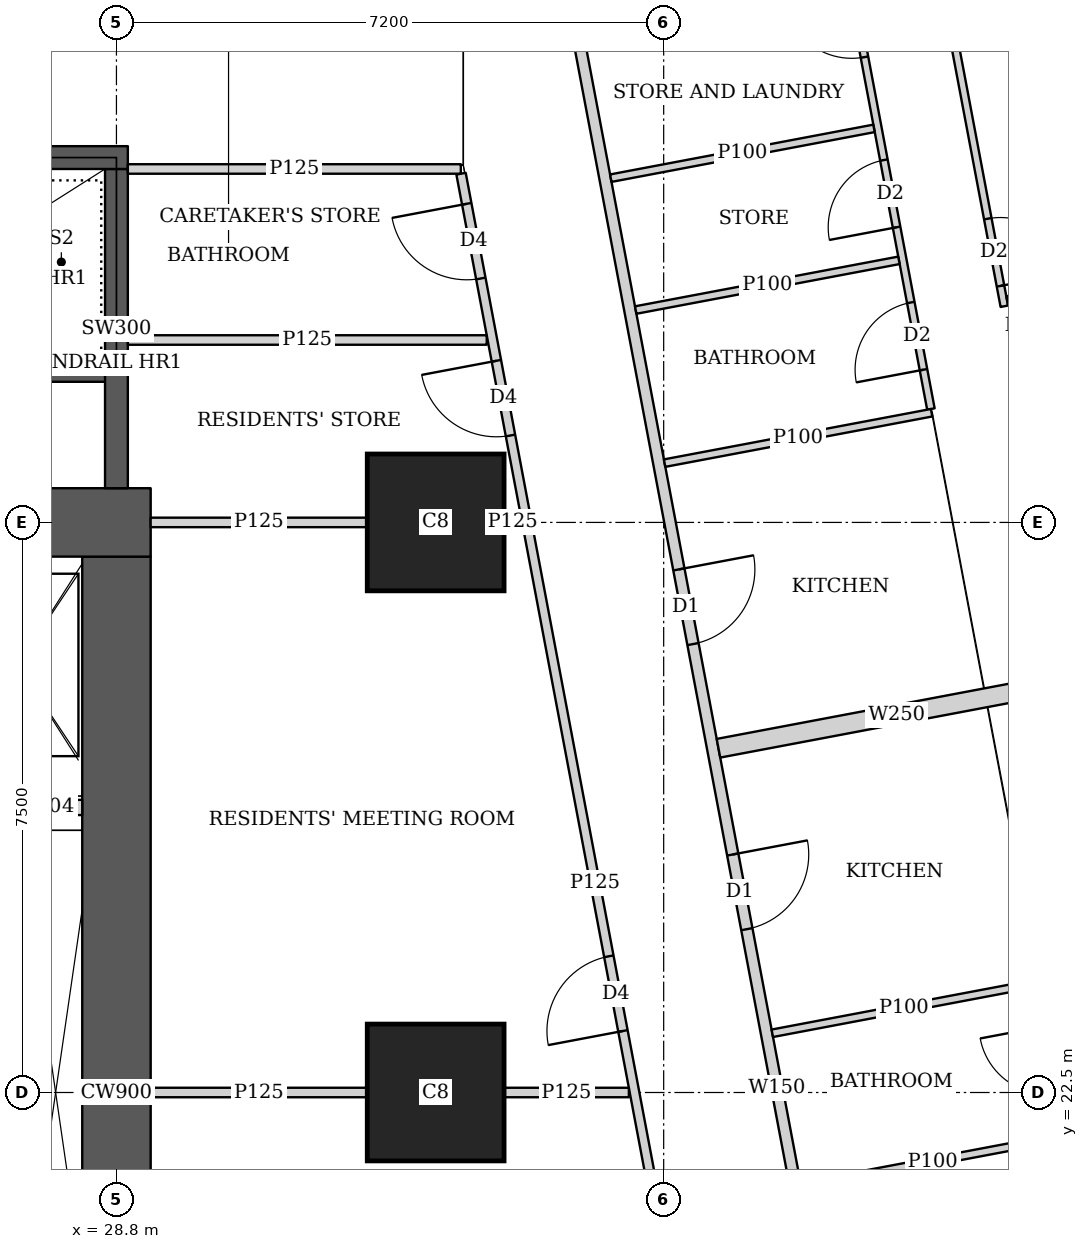
"""IFC4 building model, lengths in metres.
Left out: names, types, materials, properties, quantities, classifications, styles, units other than length and angle.
Written with IfcOpenShell. Run it as: python <this file> out.ifc"""

import sys

from ifc_helpers import new_model, si_unit, direction, frame, frame_2d, origin, origin_2d, place, context, subcontext, project, spatial, rectangle, extrude, element, fill, save


model = new_model("IFC4")
c1 = context("Model", 3, precision=1e-05, world=origin(), true_north=direction((0.0, 1.0)))
c2 = subcontext(c1, "Body", "Model", "MODEL_VIEW")
j1 = project(units=[si_unit("LENGTHUNIT", "METRE"), si_unit("PLANEANGLEUNIT", "RADIAN")], contexts=[c1])
p1 = place(None, origin())
s1 = spatial("IfcSite", under=j1, at=p1, CompositionType="ELEMENT")
p2 = place(p1, origin())
s2 = spatial("IfcBuilding", under=s1, at=p2, CompositionType="ELEMENT")
p3 = place(p2, frame((0.0, 0.0, 68.75)))
s3 = spatial("IfcBuildingStorey", under=s2, at=p3, CompositionType="ELEMENT", Elevation=68.75)
for number, where, z_axis, x_axis in (
    (1, (33.0, 22.5, 0.0), (0.0, 0.0, 1.0), (1.0, 0.0, 0.0)),
    (2, (33.0, 30.0, 0.0), (0.0, 0.0, 1.0), (1.0, 0.0, 0.0)),
):
    element("IfcColumn", number, at=place(p3, frame(where, z_axis=z_axis, x_axis=x_axis)), inside=s3, PredefinedType="COLUMN", context=c2, shape_type="SweptSolid", body=[
        extrude(rectangle(XDim=1.8, YDim=1.8, at=origin_2d()), origin(), (0.0, 0.0, 1.0), 3.75),
    ])
p4 = place(p3, frame((13.95, 30.0, 0.0), z_axis=(0.0, 0.0, 1.0), x_axis=(1.0, 0.0, 0.0)))
e3 = element("IfcWall", 3, at=p4, inside=s3, PredefinedType="SHEAR", context=c2, shape_type="SweptSolid", body=[
    extrude(rectangle(XDim=15.3, YDim=0.9, at=frame_2d((7.65, 0.0))), origin(), (0.0, 0.0, 1.0), 3.75),
])
p5 = place(p4, frame((4.45, 0.0, 0.0)))
e4 = element("IfcOpeningElement", 4, at=p5, cuts=e3, PredefinedType="OPENING", context=c2, shape_type="SweptSolid", body=[
    extrude(rectangle(XDim=1.8, YDim=2.1, at=frame_2d((0.9, 1.05))), frame((0.0, 0.46, 0.0), z_axis=(0.0, -1.0, 0.0), x_axis=(1.0, 0.0, 0.0)), (0.0, 0.0, 1.0), 0.92),
])
p6 = place(p4, frame((10.7, 0.0, 0.0)))
e5 = element("IfcOpeningElement", 5, at=p6, cuts=e3, PredefinedType="OPENING", context=c2, shape_type="SweptSolid", body=[
    extrude(rectangle(XDim=1.1, YDim=2.1, at=frame_2d((0.55, 1.05))), frame((0.0, 0.46, 0.0), z_axis=(0.0, -1.0, 0.0), x_axis=(1.0, 0.0, 0.0)), (0.0, 0.0, 1.0), 0.92),
])
p7 = place(p3, frame((28.8, 15.45, 0.0), z_axis=(0.0, 0.0, 1.0), x_axis=(0.0, 1.0, 0.0)))
e6 = element("IfcWall", 6, at=p7, inside=s3, PredefinedType="SHEAR", context=c2, shape_type="SweptSolid", body=[
    extrude(rectangle(XDim=14.1, YDim=0.9, at=frame_2d((7.05, 0.0))), origin(), (0.0, 0.0, 1.0), 3.75),
])
p8 = place(p3, frame((21.45, 34.8, 0.0), z_axis=(0.0, 0.0, 1.0), x_axis=(1.0, 0.0, 0.0)))
e7 = element("IfcWall", 7, at=p8, inside=s3, PredefinedType="SHEAR", context=c2, shape_type="SweptSolid", body=[
    extrude(rectangle(XDim=7.5, YDim=0.3, at=frame_2d((3.75, 0.0))), origin(), (0.0, 0.0, 1.0), 3.75),
])
p9 = place(p8, frame((0.5, 0.0, 0.0)))
e8 = element("IfcOpeningElement", 8, at=p9, cuts=e7, PredefinedType="OPENING", context=c2, shape_type="SweptSolid", body=[
    extrude(rectangle(XDim=1.1, YDim=2.1, at=frame_2d((0.55, 1.05))), frame((0.0, 0.16, 0.0), z_axis=(0.0, -1.0, 0.0), x_axis=(1.0, 0.0, 0.0)), (0.0, 0.0, 1.0), 0.32),
])
p10 = place(p3, frame((28.8, 30.45, 0.0), z_axis=(0.0, 0.0, 1.0), x_axis=(0.0, 1.0, 0.0)))
e9 = element("IfcWall", 9, at=p10, inside=s3, PredefinedType="SHEAR", context=c2, shape_type="SweptSolid", body=[
    extrude(rectangle(XDim=4.2, YDim=0.3, at=frame_2d((2.1, 0.0))), origin(), (0.0, 0.0, 1.0), 3.75),
])
p11 = place(p3, frame((33.68, 42.723, 0.0), z_axis=(0.0, 0.0, 1.0), x_axis=(0.185624129307, -0.98262082342, 0.0)))
e10 = element("IfcWall", 10, at=p11, inside=s3, PredefinedType="SOLIDWALL", context=c2, shape_type="SweptSolid", body=[
    extrude(rectangle(XDim=41.051, YDim=0.15, at=frame_2d((20.526, 0.0))), origin(), (0.0, 0.0, 1.0), 2.45),
])
p12 = place(p11, frame((13.577, 0.0, 0.0)))
e11 = element("IfcOpeningElement", 11, at=p12, cuts=e10, PredefinedType="OPENING", context=c2, shape_type="SweptSolid", body=[
    extrude(rectangle(XDim=1.0, YDim=2.1, at=frame_2d((0.5, 1.05))), frame((0.0, 0.085, 0.0), z_axis=(0.0, -1.0, 0.0), x_axis=(1.0, 0.0, 0.0)), (0.0, 0.0, 1.0), 0.17),
])
p13 = place(p11, frame((17.394, 0.0, 0.0)))
e12 = element("IfcOpeningElement", 12, at=p13, cuts=e10, PredefinedType="OPENING", context=c2, shape_type="SweptSolid", body=[
    extrude(rectangle(XDim=1.0, YDim=2.1, at=frame_2d((0.5, 1.05))), frame((0.0, 0.085, 0.0), z_axis=(0.0, -1.0, 0.0), x_axis=(1.0, 0.0, 0.0)), (0.0, 0.0, 1.0), 0.17),
])
p14 = place(p11, frame((26.758, 0.0, 0.0)))
e13 = element("IfcOpeningElement", 13, at=p14, cuts=e10, PredefinedType="OPENING", context=c2, shape_type="SweptSolid", body=[
    extrude(rectangle(XDim=1.0, YDim=2.1, at=frame_2d((0.5, 1.05))), frame((0.0, 0.085, 0.0), z_axis=(0.0, -1.0, 0.0), x_axis=(1.0, 0.0, 0.0)), (0.0, 0.0, 1.0), 0.17),
])
p15 = place(p11, frame((32.193, 0.0, 0.0)))
e14 = element("IfcOpeningElement", 14, at=p15, cuts=e10, PredefinedType="OPENING", context=c2, shape_type="SweptSolid", body=[
    extrude(rectangle(XDim=1.0, YDim=2.1, at=frame_2d((0.5, 1.05))), frame((0.0, 0.085, 0.0), z_axis=(0.0, -1.0, 0.0), x_axis=(1.0, 0.0, 0.0)), (0.0, 0.0, 1.0), 0.17),
])
p16 = place(p3, frame((38.9, 41.22, 0.0), z_axis=(0.0, 0.0, 1.0), x_axis=(0.185595712897, -0.982626191059, 0.0)))
e15 = element("IfcWall", 15, at=p16, inside=s3, PredefinedType="PARTITIONING", context=c2, shape_type="SweptSolid", body=[
    extrude(rectangle(XDim=8.524, YDim=0.1, at=frame_2d((4.262, 0.0))), origin(), (0.0, 0.0, 1.0), 3.45),
])
p17 = place(p16, frame((7.352, 0.0, 0.0)))
e16 = element("IfcOpeningElement", 16, at=p17, cuts=e15, PredefinedType="OPENING", context=c2, shape_type="SweptSolid", body=[
    extrude(rectangle(XDim=0.9, YDim=2.1, at=frame_2d((0.45, 1.05))), frame((0.0, 0.06, 0.0), z_axis=(0.0, -1.0, 0.0), x_axis=(1.0, 0.0, 0.0)), (0.0, 0.0, 1.0), 0.12),
])
p18 = place(p16, frame((1.9, 0.0, 0.0)))
e17 = element("IfcOpeningElement", 17, at=p18, cuts=e15, PredefinedType="OPENING", context=c2, shape_type="SweptSolid", body=[
    extrude(rectangle(XDim=0.9, YDim=2.1, at=frame_2d((0.45, 1.05))), frame((0.0, 0.06, 0.0), z_axis=(0.0, -1.0, 0.0), x_axis=(1.0, 0.0, 0.0)), (0.0, 0.0, 1.0), 0.12),
])
p19 = place(p3, frame((37.515, 42.089, 0.0), z_axis=(0.0, 0.0, 1.0), x_axis=(0.185565000991, -0.982631991341, 0.0)))
e18 = element("IfcWall", 18, at=p19, inside=s3, PredefinedType="PARTITIONING", context=c2, shape_type="SweptSolid", body=[
    extrude(rectangle(XDim=10.784, YDim=0.1, at=frame_2d((5.392, 0.0))), origin(), (0.0, 0.0, 1.0), 3.45),
])
p20 = place(p19, frame((9.358, 0.0, 0.0)))
e19 = element("IfcOpeningElement", 19, at=p20, cuts=e18, PredefinedType="OPENING", context=c2, shape_type="SweptSolid", body=[
    extrude(rectangle(XDim=0.9, YDim=2.1, at=frame_2d((0.45, 1.05))), frame((0.0, 0.06, 0.0), z_axis=(0.0, -1.0, 0.0), x_axis=(1.0, 0.0, 0.0)), (0.0, 0.0, 1.0), 0.12),
])
p21 = place(p19, frame((5.173, 0.0, 0.0)))
e20 = element("IfcOpeningElement", 20, at=p21, cuts=e18, PredefinedType="OPENING", context=c2, shape_type="SweptSolid", body=[
    extrude(rectangle(XDim=0.9, YDim=2.1, at=frame_2d((0.45, 1.05))), frame((0.0, 0.06, 0.0), z_axis=(0.0, -1.0, 0.0), x_axis=(1.0, 0.0, 0.0)), (0.0, 0.0, 1.0), 0.12),
])
p22 = place(p19, frame((2.629, 0.0, 0.0)))
e21 = element("IfcOpeningElement", 21, at=p22, cuts=e18, PredefinedType="OPENING", context=c2, shape_type="SweptSolid", body=[
    extrude(rectangle(XDim=0.9, YDim=2.1, at=frame_2d((0.45, 1.05))), frame((0.0, 0.06, 0.0), z_axis=(0.0, -1.0, 0.0), x_axis=(1.0, 0.0, 0.0)), (0.0, 0.0, 1.0), 0.12),
])
p23 = place(p19, frame((7.451, 0.0, 0.0)))
e22 = element("IfcOpeningElement", 22, at=p23, cuts=e18, PredefinedType="OPENING", context=c2, shape_type="SweptSolid", body=[
    extrude(rectangle(XDim=0.9, YDim=2.1, at=frame_2d((0.45, 1.05))), frame((0.0, 0.06, 0.0), z_axis=(0.0, -1.0, 0.0), x_axis=(1.0, 0.0, 0.0)), (0.0, 0.0, 1.0), 0.12),
])
p24 = place(p3, frame((44.693, 33.713, 0.0), z_axis=(0.0, 0.0, 1.0), x_axis=(-0.982615600536, -0.185651775062, 0.0)))
e23 = element("IfcWall", 23, at=p24, inside=s3, PredefinedType="PARTITIONING", context=c2, shape_type="SweptSolid", body=[
    extrude(rectangle(XDim=4.249, YDim=0.1, at=frame_2d((2.125, 0.0))), origin(), (0.0, 0.0, 1.0), 2.0),
])
p25 = place(p3, frame((39.525, 31.443, 0.0), z_axis=(0.0, 0.0, 1.0), x_axis=(-0.982648035033, -0.185480023848, 0.0)))
e24 = element("IfcWall", 24, at=p25, inside=s3, PredefinedType="PARTITIONING", context=c2, shape_type="SweptSolid", body=[
    extrude(rectangle(XDim=3.575, YDim=0.1, at=frame_2d((1.788, 0.0))), origin(), (0.0, 0.0, 1.0), 3.45),
])
p26 = place(p3, frame((38.767, 35.184, 0.0), z_axis=(0.0, 0.0, 1.0), x_axis=(-0.982578451485, -0.185848289414, 0.0)))
e25 = element("IfcWall", 25, at=p26, inside=s3, PredefinedType="PARTITIONING", context=c2, shape_type="SweptSolid", body=[
    extrude(rectangle(XDim=3.525, YDim=0.1, at=frame_2d((1.762, 0.0))), origin(), (0.0, 0.0, 1.0), 3.45),
])
p27 = place(p3, frame((39.095, 33.448, 0.0), z_axis=(0.0, 0.0, 1.0), x_axis=(-0.982626628545, -0.185593396635, 0.0)))
e26 = element("IfcWall", 26, at=p27, inside=s3, PredefinedType="PARTITIONING", context=c2, shape_type="SweptSolid", body=[
    extrude(rectangle(XDim=3.524, YDim=0.1, at=frame_2d((1.762, 0.0))), origin(), (0.0, 0.0, 1.0), 3.45),
])
p28 = place(p3, frame((40.893, 23.934, 0.0), z_axis=(0.0, 0.0, 1.0), x_axis=(-0.982588017646, -0.185797706064, 0.0)))
e27 = element("IfcWall", 27, at=p28, inside=s3, PredefinedType="PARTITIONING", context=c2, shape_type="SweptSolid", body=[
    extrude(rectangle(XDim=3.525, YDim=0.1, at=frame_2d((1.763, 0.0))), origin(), (0.0, 0.0, 1.0), 3.45),
])
p29 = place(p3, frame((41.273, 21.919, 0.0), z_axis=(0.0, 0.0, 1.0), x_axis=(-0.982636169624, -0.185542874149, 0.0)))
e28 = element("IfcWall", 28, at=p29, inside=s3, PredefinedType="PARTITIONING", context=c2, shape_type="SweptSolid", body=[
    extrude(rectangle(XDim=3.525, YDim=0.1, at=frame_2d((1.763, 0.0))), origin(), (0.0, 0.0, 1.0), 2.45),
])
p30 = place(p3, frame((41.413, 27.915, 0.0), z_axis=(0.0, 0.0, 1.0), x_axis=(-0.982635807605, -0.185544791394, 0.0)))
e29 = element("IfcWall", 29, at=p30, inside=s3, PredefinedType="SOLIDWALL", context=c2, shape_type="SweptSolid", body=[
    extrude(rectangle(XDim=4.775, YDim=0.25, at=frame_2d((2.388, 0.0))), origin(), (0.0, 0.0, 1.0), 3.45),
])
p31 = place(p3, frame((28.95, 34.65, 0.0), z_axis=(0.0, 0.0, 1.0), x_axis=(1.0, 0.0, 0.0)))
e30 = element("IfcWall", 30, at=p31, inside=s3, PredefinedType="PARTITIONING", context=c2, shape_type="SweptSolid", body=[
    extrude(rectangle(XDim=4.381, YDim=0.125, at=frame_2d((2.19, 0.0))), origin(), (0.0, 0.0, 1.0), 3.45),
])
p32 = place(p3, frame((36.861, 15.913, 0.0), z_axis=(0.0, 0.0, 1.0), x_axis=(-0.185588307143, 0.982627589808, 0.0)))
e31 = element("IfcWall", 31, at=p32, inside=s3, PredefinedType="PARTITIONING", context=c2, shape_type="SweptSolid", body=[
    extrude(rectangle(XDim=19.005, YDim=0.125, at=frame_2d((9.502, 0.0))), origin(), (0.0, 0.0, 1.0), 2.45),
])
p33 = place(p32, frame((7.527, 0.0, 0.0)))
e32 = element("IfcOpeningElement", 32, at=p33, cuts=e31, PredefinedType="OPENING", context=c2, shape_type="SweptSolid", body=[
    extrude(rectangle(XDim=1.0, YDim=2.1, at=frame_2d((0.5, 1.05))), frame((0.0, 0.073, 0.0), z_axis=(0.0, -1.0, 0.0), x_axis=(1.0, 0.0, 0.0)), (0.0, 0.0, 1.0), 0.145),
])
p34 = place(p32, frame((15.5, 0.0, 0.0)))
e33 = element("IfcOpeningElement", 33, at=p34, cuts=e31, PredefinedType="OPENING", context=c2, shape_type="SweptSolid", body=[
    extrude(rectangle(XDim=1.0, YDim=2.1, at=frame_2d((0.5, 1.05))), frame((0.0, 0.073, 0.0), z_axis=(0.0, -1.0, 0.0), x_axis=(1.0, 0.0, 0.0)), (0.0, 0.0, 1.0), 0.145),
])
p35 = place(p32, frame((17.602, 0.0, 0.0)))
e34 = element("IfcOpeningElement", 34, at=p35, cuts=e31, PredefinedType="OPENING", context=c2, shape_type="SweptSolid", body=[
    extrude(rectangle(XDim=1.0, YDim=2.1, at=frame_2d((0.5, 1.05))), frame((0.0, 0.073, 0.0), z_axis=(0.0, -1.0, 0.0), x_axis=(1.0, 0.0, 0.0)), (0.0, 0.0, 1.0), 0.145),
])
p36 = place(p3, frame((29.25, 22.5, 0.0), z_axis=(0.0, 0.0, 1.0), x_axis=(1.0, 0.0, 0.0)))
e35 = element("IfcWall", 35, at=p36, inside=s3, PredefinedType="PARTITIONING", context=c2, shape_type="SweptSolid", body=[
    extrude(rectangle(XDim=2.849, YDim=0.125, at=frame_2d((1.425, 0.0))), origin(), (0.0, 0.0, 1.0), 3.45),
])
p37 = place(p3, frame((33.901, 22.5, 0.0), z_axis=(0.0, 0.0, 1.0), x_axis=(1.0, 0.0, 0.0)))
e36 = element("IfcWall", 36, at=p37, inside=s3, PredefinedType="PARTITIONING", context=c2, shape_type="SweptSolid", body=[
    extrude(rectangle(XDim=1.641, YDim=0.125, at=frame_2d((0.821, 0.0))), origin(), (0.0, 0.0, 1.0), 2.45),
])
p38 = place(p3, frame((29.25, 30.0, 0.0), z_axis=(0.0, 0.0, 1.0), x_axis=(1.0, 0.0, 0.0)))
e37 = element("IfcWall", 37, at=p38, inside=s3, PredefinedType="PARTITIONING", context=c2, shape_type="SweptSolid", body=[
    extrude(rectangle(XDim=2.849, YDim=0.125, at=frame_2d((1.425, 0.0))), origin(), (0.0, 0.0, 1.0), 3.45),
])
p39 = place(p3, frame((33.901, 30.0, 0.0), z_axis=(0.0, 0.0, 1.0), x_axis=(1.0, 0.0, 0.0)))
e38 = element("IfcWall", 38, at=p39, inside=s3, PredefinedType="PARTITIONING", context=c2, shape_type="SweptSolid", body=[
    extrude(rectangle(XDim=0.224, YDim=0.125, at=frame_2d((0.112, 0.0))), origin(), (0.0, 0.0, 1.0), 2.45),
])
p40 = place(p3, frame((28.95, 32.4, 0.0), z_axis=(0.0, 0.0, 1.0), x_axis=(1.0, 0.0, 0.0)))
e39 = element("IfcWall", 39, at=p40, inside=s3, PredefinedType="PARTITIONING", context=c2, shape_type="SweptSolid", body=[
    extrude(rectangle(XDim=4.722, YDim=0.125, at=frame_2d((2.361, 0.0))), origin(), (0.0, 0.0, 1.0), 3.45),
])
p41 = place(p3, frame((23.0, 31.95, 0.0), z_axis=(0.0, 0.0, 1.0), x_axis=(1.0, 0.0, 0.0)))
e40 = element("IfcWall", 40, at=p41, inside=s3, PredefinedType="SHEAR", context=c2, shape_type="SweptSolid", body=[
    extrude(rectangle(XDim=5.8, YDim=0.2, at=frame_2d((2.9, 0.0))), origin(), (0.0, 0.0, 1.0), 3.75),
])
p42 = place(p3, frame((27.4, 26.25, 0.0), z_axis=(0.0, 0.0, 1.0), x_axis=(1.0, 0.0, 0.0)))
e41 = element("IfcWall", 41, at=p42, inside=s3, PredefinedType="SOLIDWALL", context=c2, shape_type="SweptSolid", body=[
    extrude(rectangle(XDim=0.95, YDim=0.2, at=frame_2d((0.475, 0.0))), origin(), (0.0, 0.0, 1.0), 3.45),
])
p43 = place(p17, origin())
e42 = element("IfcDoor", 42, at=p43, inside=s3, OperationType="SINGLE_SWING_RIGHT", PredefinedType="DOOR", context=c2, shape_type="SweptSolid", body=[
    extrude(rectangle(XDim=0.9, YDim=2.1, at=frame_2d((0.45, 1.05))), frame((0.0, 0.025, 0.0), z_axis=(0.0, -1.0, 0.0), x_axis=(1.0, 0.0, 0.0)), (0.0, 0.0, 1.0), 0.05),
])
fill(e16, e42)
p44 = place(p20, origin())
e43 = element("IfcDoor", 43, at=p44, inside=s3, OperationType="SINGLE_SWING_LEFT", PredefinedType="DOOR", context=c2, shape_type="SweptSolid", body=[
    extrude(rectangle(XDim=0.9, YDim=2.1, at=frame_2d((0.45, 1.05))), frame((0.0, 0.025, 0.0), z_axis=(0.0, -1.0, 0.0), x_axis=(1.0, 0.0, 0.0)), (0.0, 0.0, 1.0), 0.05),
])
fill(e19, e43)
p45 = place(p21, origin())
e44 = element("IfcDoor", 44, at=p45, inside=s3, OperationType="SINGLE_SWING_RIGHT", PredefinedType="DOOR", context=c2, shape_type="SweptSolid", body=[
    extrude(rectangle(XDim=0.9, YDim=2.1, at=frame_2d((0.45, 1.05))), frame((0.0, 0.025, 0.0), z_axis=(0.0, -1.0, 0.0), x_axis=(1.0, 0.0, 0.0)), (0.0, 0.0, 1.0), 0.05),
])
fill(e20, e44)
p46 = place(p23, origin())
e45 = element("IfcDoor", 45, at=p46, inside=s3, OperationType="SINGLE_SWING_LEFT", PredefinedType="DOOR", context=c2, shape_type="SweptSolid", body=[
    extrude(rectangle(XDim=0.9, YDim=2.1, at=frame_2d((0.45, 1.05))), frame((0.0, 0.025, 0.0), z_axis=(0.0, -1.0, 0.0), x_axis=(1.0, 0.0, 0.0)), (0.0, 0.0, 1.0), 0.05),
])
fill(e22, e45)
p47 = place(p12, origin())
e46 = element("IfcDoor", 46, at=p47, inside=s3, OperationType="SINGLE_SWING_LEFT", PredefinedType="DOOR", context=c2, shape_type="SweptSolid", body=[
    extrude(rectangle(XDim=1.0, YDim=2.1, at=frame_2d((0.5, 1.05))), frame((0.0, 0.025, 0.0), z_axis=(0.0, -1.0, 0.0), x_axis=(1.0, 0.0, 0.0)), (0.0, 0.0, 1.0), 0.05),
])
fill(e11, e46)
p48 = place(p13, origin())
e47 = element("IfcDoor", 47, at=p48, inside=s3, OperationType="SINGLE_SWING_LEFT", PredefinedType="DOOR", context=c2, shape_type="SweptSolid", body=[
    extrude(rectangle(XDim=1.0, YDim=2.1, at=frame_2d((0.5, 1.05))), frame((0.0, 0.025, 0.0), z_axis=(0.0, -1.0, 0.0), x_axis=(1.0, 0.0, 0.0)), (0.0, 0.0, 1.0), 0.05),
])
fill(e12, e47)
p49 = place(p33, origin())
e48 = element("IfcDoor", 48, at=p49, inside=s3, OperationType="SINGLE_SWING_LEFT", PredefinedType="DOOR", context=c2, shape_type="SweptSolid", body=[
    extrude(rectangle(XDim=1.0, YDim=2.1, at=frame_2d((0.5, 1.05))), frame((0.0, 0.025, 0.0), z_axis=(0.0, -1.0, 0.0), x_axis=(1.0, 0.0, 0.0)), (0.0, 0.0, 1.0), 0.05),
])
fill(e32, e48)
p50 = place(p34, origin())
e49 = element("IfcDoor", 49, at=p50, inside=s3, OperationType="SINGLE_SWING_RIGHT", PredefinedType="DOOR", context=c2, shape_type="SweptSolid", body=[
    extrude(rectangle(XDim=1.0, YDim=2.1, at=frame_2d((0.5, 1.05))), frame((0.0, 0.025, 0.0), z_axis=(0.0, -1.0, 0.0), x_axis=(1.0, 0.0, 0.0)), (0.0, 0.0, 1.0), 0.05),
])
fill(e33, e49)
p51 = place(p35, origin())
e50 = element("IfcDoor", 50, at=p51, inside=s3, OperationType="SINGLE_SWING_RIGHT", PredefinedType="DOOR", context=c2, shape_type="SweptSolid", body=[
    extrude(rectangle(XDim=1.0, YDim=2.1, at=frame_2d((0.5, 1.05))), frame((0.0, 0.025, 0.0), z_axis=(0.0, -1.0, 0.0), x_axis=(1.0, 0.0, 0.0)), (0.0, 0.0, 1.0), 0.05),
])
fill(e34, e50)
save(model, sys.argv[1])
